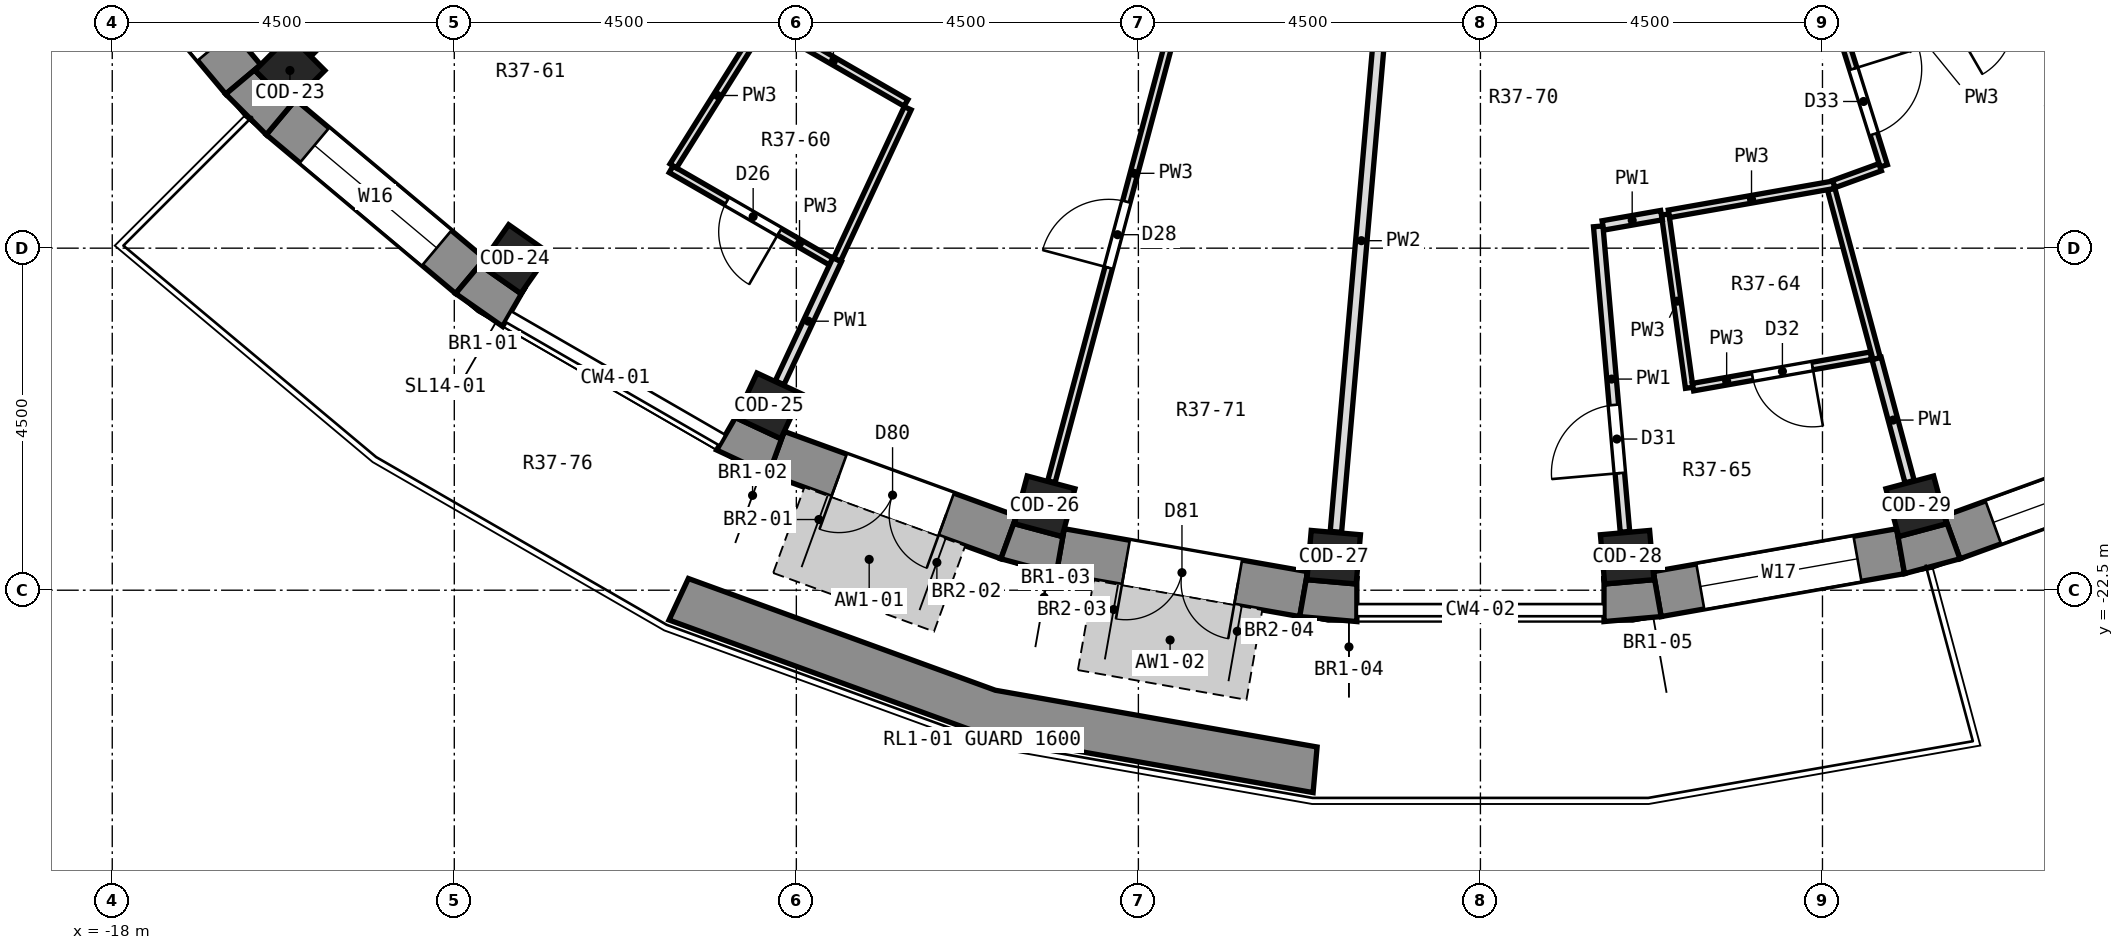
"""IFC4 building model, lengths in metres.
Left out: names, types, materials, properties, quantities, classifications, styles, units other than length and angle.
Written with IfcOpenShell. Run it as: python <this file> out.ifc"""

import sys

from ifc_helpers import new_model, si_unit, direction, frame, frame_2d, origin, origin_2d, place, context, subcontext, project, spatial, polyline, rectangle, outline, extrude, element, fill, save


model = new_model("IFC4")
c1 = context("Model", 3, precision=1e-05, world=origin(), true_north=direction((0.0, 1.0)))
c2 = subcontext(c1, "Body", "Model", "MODEL_VIEW")
j1 = project(units=[si_unit("LENGTHUNIT", "METRE"), si_unit("PLANEANGLEUNIT", "RADIAN")], contexts=[c1])
p1 = place(None, origin())
s1 = spatial("IfcSite", under=j1, at=p1, CompositionType="ELEMENT")
p2 = place(p1, origin())
s2 = spatial("IfcBuilding", under=s1, at=p2, CompositionType="ELEMENT")
p3 = place(p2, frame((0.0, 0.0, 269.3)))
s3 = spatial("IfcBuildingStorey", under=s2, at=p3, CompositionType="ELEMENT", Elevation=269.3)
for number, where, z_axis, x_axis in (
    (1, (-15.662, -15.662, 0.0), (0.0, 0.0, 1.0), (-0.707, -0.707, 0.0)),
    (2, (-12.705, -18.144, 0.0), (0.0, 0.0, 1.0), (-0.574, -0.819, 0.0)),
    (3, (-9.361, -20.075, 0.0), (0.0, 0.0, 1.0), (-0.423, -0.906, 0.0)),
    (4, (-5.733, -21.395, 0.0), (0.0, 0.0, 1.0), (-0.259, -0.966, 0.0)),
    (5, (-1.93, -22.066, 0.0), (0.0, 0.0, 1.0), (-0.087, -0.996, 0.0)),
    (6, (1.93, -22.066, 0.0), (0.0, 0.0, 1.0), (0.087, -0.996, 0.0)),
    (7, (5.733, -21.395, 0.0), (0.0, 0.0, 1.0), (0.259, -0.966, 0.0)),
):
    element("IfcColumn", number, at=place(p3, frame(where, z_axis=z_axis, x_axis=x_axis)), inside=s3, PredefinedType="COLUMN", context=c2, shape_type="SweptSolid", body=[
        extrude(rectangle(XDim=0.65, YDim=0.65, at=origin_2d()), origin(), (0.0, 0.0, 1.0), 3.3),
    ])
p4 = place(p3, frame((-18.367, -13.29, 0.0), z_axis=(0.0, 0.0, 1.0), x_axis=(0.64277291405, -0.766056773982, 0.0)))
e8 = element("IfcWall", 8, at=p4, inside=s3, PredefinedType="SOLIDWALL", context=c2, shape_type="SweptSolid", body=[
    extrude(rectangle(XDim=3.252, YDim=0.6, at=frame_2d((1.626, 0.0))), origin(), (0.0, 0.0, 1.0), 2.9),
])
p5 = place(p4, frame((0.576, 0.0, 0.9)))
e9 = element("IfcOpeningElement", 9, at=p5, cuts=e8, PredefinedType="OPENING", context=c2, shape_type="SweptSolid", body=[
    extrude(rectangle(XDim=2.1, YDim=1.8, at=frame_2d((1.05, 0.9))), frame((0.0, 0.312, 0.0), z_axis=(0.0, -1.0, 0.0), x_axis=(1.0, 0.0, 0.0)), (0.0, 0.0, 1.0), 0.624),
])
p6 = place(p3, frame((-15.781, -16.277, 0.0), z_axis=(0.0, 0.0, 1.0), x_axis=(0.766056773982, -0.64277291405, 0.0)))
e10 = element("IfcWall", 10, at=p6, inside=s3, PredefinedType="SOLIDWALL", context=c2, shape_type="SweptSolid", body=[
    extrude(rectangle(XDim=3.252, YDim=0.6, at=frame_2d((1.626, 0.0))), origin(), (0.0, 0.0, 1.0), 2.9),
])
p7 = place(p6, frame((0.576, 0.0, 0.9)))
e11 = element("IfcOpeningElement", 11, at=p7, cuts=e10, PredefinedType="OPENING", context=c2, shape_type="SweptSolid", body=[
    extrude(rectangle(XDim=2.1, YDim=1.8, at=frame_2d((1.05, 0.9))), frame((0.0, 0.312, 0.0), z_axis=(0.0, -1.0, 0.0), x_axis=(1.0, 0.0, 0.0)), (0.0, 0.0, 1.0), 0.624),
])
p8 = place(p3, frame((-9.262, -20.693, 0.0), z_axis=(0.0, 0.0, 1.0), x_axis=(0.939679383794, -0.342056509473, 0.0)))
e12 = element("IfcWall", 12, at=p8, inside=s3, PredefinedType="SOLIDWALL", context=c2, shape_type="SweptSolid", body=[
    extrude(rectangle(XDim=3.252, YDim=0.6, at=frame_2d((1.626, 0.0))), origin(), (0.0, 0.0, 1.0), 2.9),
])
p9 = place(p8, frame((0.876, 0.0, 0.0)))
e13 = element("IfcOpeningElement", 13, at=p9, cuts=e12, PredefinedType="OPENING", context=c2, shape_type="SweptSolid", body=[
    extrude(rectangle(XDim=1.5, YDim=2.4, at=frame_2d((0.75, 1.2))), frame((0.0, 0.312, 0.0), z_axis=(0.0, -1.0, 0.0), x_axis=(1.0, 0.0, 0.0)), (0.0, 0.0, 1.0), 0.624),
])
p10 = place(p3, frame((-5.528, -21.987, 0.0), z_axis=(0.0, 0.0, 1.0), x_axis=(0.984806225186, -0.173656842178, 0.0)))
e14 = element("IfcWall", 14, at=p10, inside=s3, PredefinedType="SOLIDWALL", context=c2, shape_type="SweptSolid", body=[
    extrude(rectangle(XDim=3.252, YDim=0.6, at=frame_2d((1.626, 0.0))), origin(), (0.0, 0.0, 1.0), 2.9),
])
p11 = place(p10, frame((0.876, 0.0, 0.0)))
e15 = element("IfcOpeningElement", 15, at=p11, cuts=e14, PredefinedType="OPENING", context=c2, shape_type="SweptSolid", body=[
    extrude(rectangle(XDim=1.5, YDim=2.4, at=frame_2d((0.75, 1.2))), frame((0.0, 0.312, 0.0), z_axis=(0.0, -1.0, 0.0), x_axis=(1.0, 0.0, 0.0)), (0.0, 0.0, 1.0), 0.624),
])
p12 = place(p3, frame((2.325, -22.551, 0.0), z_axis=(0.0, 0.0, 1.0), x_axis=(0.984806225186, 0.173656842178, 0.0)))
e16 = element("IfcWall", 16, at=p12, inside=s3, PredefinedType="SOLIDWALL", context=c2, shape_type="SweptSolid", body=[
    extrude(rectangle(XDim=3.252, YDim=0.6, at=frame_2d((1.626, 0.0))), origin(), (0.0, 0.0, 1.0), 2.9),
])
p13 = place(p12, frame((0.576, 0.0, 0.9)))
e17 = element("IfcOpeningElement", 17, at=p13, cuts=e16, PredefinedType="OPENING", context=c2, shape_type="SweptSolid", body=[
    extrude(rectangle(XDim=2.1, YDim=1.8, at=frame_2d((1.05, 0.9))), frame((0.0, 0.312, 0.0), z_axis=(0.0, -1.0, 0.0), x_axis=(1.0, 0.0, 0.0)), (0.0, 0.0, 1.0), 0.624),
])
p14 = place(p3, frame((6.206, -21.805, 0.0), z_axis=(0.0, 0.0, 1.0), x_axis=(0.939679383794, 0.342056509473, 0.0)))
e18 = element("IfcWall", 18, at=p14, inside=s3, PredefinedType="SOLIDWALL", context=c2, shape_type="SweptSolid", body=[
    extrude(rectangle(XDim=3.252, YDim=0.6, at=frame_2d((1.626, 0.0))), origin(), (0.0, 0.0, 1.0), 2.9),
])
p15 = place(p14, frame((0.576, 0.0, 0.9)))
e19 = element("IfcOpeningElement", 19, at=p15, cuts=e18, PredefinedType="OPENING", context=c2, shape_type="SweptSolid", body=[
    extrude(rectangle(XDim=2.1, YDim=1.8, at=frame_2d((1.05, 0.9))), frame((0.0, 0.312, 0.0), z_axis=(0.0, -1.0, 0.0), x_axis=(1.0, 0.0, 0.0)), (0.0, 0.0, 1.0), 0.624),
])
p16 = place(p3, origin())
e20 = element("IfcWall", 20, at=p16, inside=s3, PredefinedType="SOLIDWALL", context=c2, shape_type="SweptSolid", body=[
    extrude(outline(polyline([(-15.973, -16.507), (-15.588, -16.047), (-15.662, -16.122), (-16.122, -15.662), (-16.047, -15.588), (-16.507, -15.973), (-15.973, -16.507)])), origin(), (0.0, 0.0, 1.0), 2.9),
])
p17 = place(p3, origin())
e21 = element("IfcWall", 21, at=p17, inside=s3, PredefinedType="SOLIDWALL", context=c2, shape_type="SweptSolid", body=[
    extrude(outline(polyline([(-12.864, -19.03), (-12.564, -18.51), (-12.625, -18.597), (-13.157, -18.224), (-13.097, -18.137), (-13.482, -18.597), (-12.864, -19.03)])), origin(), (0.0, 0.0, 1.0), 2.9),
])
p18 = place(p3, origin())
e22 = element("IfcWall", 22, at=p18, inside=s3, PredefinedType="SOLIDWALL", context=c2, shape_type="SweptSolid", body=[
    extrude(outline(polyline([(-10.048, -20.656), (-9.364, -20.975), (-9.159, -20.411), (-9.204, -20.507), (-9.793, -20.232), (-9.748, -20.136), (-10.048, -20.656)])), origin(), (0.0, 0.0, 1.0), 2.9),
])
p19 = place(p3, origin())
e23 = element("IfcWall", 23, at=p19, inside=s3, PredefinedType="SOLIDWALL", context=c2, shape_type="SweptSolid", body=[
    extrude(outline(polyline([(-5.58, -22.282), (-5.476, -21.691), (-5.503, -21.793), (-6.131, -21.625), (-6.104, -21.523), (-6.309, -22.087), (-5.58, -22.282)])), origin(), (0.0, 0.0, 1.0), 2.9),
])
p20 = place(p3, origin())
e24 = element("IfcWall", 24, at=p20, inside=s3, PredefinedType="SOLIDWALL", context=c2, shape_type="SweptSolid", body=[
    extrude(outline(polyline([(-2.378, -22.847), (-1.626, -22.913), (-1.626, -22.312), (-1.635, -22.418), (-2.283, -22.361), (-2.273, -22.256), (-2.378, -22.847)])), origin(), (0.0, 0.0, 1.0), 2.9),
])
p21 = place(p3, origin())
e25 = element("IfcWall", 25, at=p21, inside=s3, PredefinedType="SOLIDWALL", context=c2, shape_type="SweptSolid", body=[
    extrude(outline(polyline([(1.626, -22.913), (2.378, -22.847), (2.273, -22.256), (2.283, -22.361), (1.635, -22.418), (1.626, -22.312), (1.626, -22.913)])), origin(), (0.0, 0.0, 1.0), 2.9),
])
p22 = place(p3, origin())
e26 = element("IfcWall", 26, at=p22, inside=s3, PredefinedType="SOLIDWALL", context=c2, shape_type="SweptSolid", body=[
    extrude(outline(polyline([(6.309, -22.087), (6.104, -21.523), (6.131, -21.625), (5.503, -21.793), (5.476, -21.691), (5.58, -22.282), (6.309, -22.087)])), origin(), (0.0, 0.0, 1.0), 2.9),
])
p23 = place(p3, origin())
e27 = element("IfcWall", 27, at=p23, inside=s3, PredefinedType="PARAPET", context=c2, shape_type="SweptSolid", body=[
    extrude(outline(polyline([(-10.675, -22.892), (-6.537, -24.398), (-2.201, -25.163), (-2.149, -24.562), (-6.382, -23.816), (-10.42, -22.346), (-10.675, -22.892)])), origin(), (0.0, 0.0, 1.0), 0.5),
])
p24 = place(p3, frame((1.55, -17.713, 0.0), z_axis=(0.0, 0.0, 1.0), x_axis=(0.087206738893, -0.996190235192, 0.0)))
e28 = element("IfcWall", 28, at=p24, inside=s3, PredefinedType="PARTITIONING", context=c2, shape_type="SweptSolid", body=[
    extrude(rectangle(XDim=4.034, YDim=0.125, at=frame_2d((2.017, 0.0))), origin(), (0.0, 0.0, 1.0), 2.9),
])
p25 = place(p24, frame((2.359, 0.0, 0.0)))
e29 = element("IfcOpeningElement", 29, at=p25, cuts=e28, PredefinedType="OPENING", context=c2, shape_type="SweptSolid", body=[
    extrude(rectangle(XDim=0.9, YDim=2.1, at=frame_2d((0.45, 1.05))), frame((0.0, 0.074, 0.0), z_axis=(0.0, -1.0, 0.0), x_axis=(1.0, 0.0, 0.0)), (0.0, 0.0, 1.0), 0.149),
])
p26 = place(p3, frame((2.431, -17.557, 0.0), z_axis=(0.0, 0.0, 1.0), x_axis=(0.137351585164, -0.990522358179, 0.0)))
e30 = element("IfcWall", 30, at=p26, inside=s3, PredefinedType="PARTITIONING", context=c2, shape_type="SweptSolid", body=[
    extrude(rectangle(XDim=2.302, YDim=0.1, at=frame_2d((1.151, 0.0))), origin(), (0.0, 0.0, 1.0), 2.9),
])
p27 = place(p3, frame((4.615, -17.222, 0.0), z_axis=(0.0, 0.0, 1.0), x_axis=(0.259222412409, -0.965817654066, 0.0)))
e31 = element("IfcWall", 31, at=p27, inside=s3, PredefinedType="PARTITIONING", context=c2, shape_type="SweptSolid", body=[
    extrude(rectangle(XDim=2.308, YDim=0.1, at=frame_2d((1.154, 0.0))), origin(), (0.0, 0.0, 1.0), 2.9),
])
p28 = place(p3, frame((5.212, -19.452, 0.0), z_axis=(0.0, 0.0, 1.0), x_axis=(0.259221341364, -0.96581794153, 0.0)))
e32 = element("IfcWall", 32, at=p28, inside=s3, PredefinedType="PARTITIONING", context=c2, shape_type="SweptSolid", body=[
    extrude(rectangle(XDim=1.677, YDim=0.125, at=frame_2d((0.838, 0.0))), origin(), (0.0, 0.0, 1.0), 2.9),
])
p29 = place(p3, frame((4.315, -13.758, 0.0), z_axis=(0.0, 0.0, 1.0), x_axis=(0.299479577404, -0.95410271078, 0.0)))
e33 = element("IfcWall", 33, at=p29, inside=s3, PredefinedType="PARTITIONING", context=c2, shape_type="SweptSolid", body=[
    extrude(rectangle(XDim=3.312, YDim=0.1, at=frame_2d((1.656, 0.0))), origin(), (0.0, 0.0, 1.0), 2.9),
])
p30 = place(p29, frame((1.974, 0.0, 0.0)))
e34 = element("IfcOpeningElement", 34, at=p30, cuts=e33, PredefinedType="OPENING", context=c2, shape_type="SweptSolid", body=[
    extrude(rectangle(XDim=0.9, YDim=2.1, at=frame_2d((0.45, 1.05))), frame((0.0, 0.062, 0.0), z_axis=(0.0, -1.0, 0.0), x_axis=(1.0, 0.0, 0.0)), (0.0, 0.0, 1.0), 0.124),
])
p31 = place(p3, frame((-10.647, -16.962, 0.0), z_axis=(0.0, 0.0, 1.0), x_axis=(0.866072215893, -0.499918910283, 0.0)))
e35 = element("IfcWall", 35, at=p31, inside=s3, PredefinedType="PARTITIONING", context=c2, shape_type="SweptSolid", body=[
    extrude(rectangle(XDim=2.438, YDim=0.1, at=frame_2d((1.219, 0.0))), origin(), (0.0, 0.0, 1.0), 2.9),
])
p32 = place(p31, frame((0.846, 0.0, 0.0)))
e36 = element("IfcOpeningElement", 36, at=p32, cuts=e35, PredefinedType="OPENING", context=c2, shape_type="SweptSolid", body=[
    extrude(rectangle(XDim=0.8, YDim=2.1, at=frame_2d((0.4, 1.05))), frame((0.0, 0.062, 0.0), z_axis=(0.0, -1.0, 0.0), x_axis=(1.0, 0.0, 0.0)), (0.0, 0.0, 1.0), 0.124),
])
p33 = place(p3, frame((-9.467, -14.986, 0.0), z_axis=(0.0, 0.0, 1.0), x_axis=(0.866006764117, -0.500032283461, 0.0)))
e37 = element("IfcWall", 37, at=p33, inside=s3, PredefinedType="PARTITIONING", context=c2, shape_type="SweptSolid", body=[
    extrude(rectangle(XDim=2.205, YDim=0.1, at=frame_2d((1.103, 0.0))), origin(), (0.0, 0.0, 1.0), 2.9),
])
p34 = place(p3, frame((2.796, -19.828, 0.0), z_axis=(0.0, 0.0, 1.0), x_axis=(0.984754600233, 0.173949352742, 0.0)))
e38 = element("IfcWall", 38, at=p34, inside=s3, PredefinedType="PARTITIONING", context=c2, shape_type="SweptSolid", body=[
    extrude(rectangle(XDim=2.377, YDim=0.1, at=frame_2d((1.189, 0.0))), origin(), (0.0, 0.0, 1.0), 2.9),
])
p35 = place(p34, frame((0.795, 0.0, 0.0)))
e39 = element("IfcOpeningElement", 39, at=p35, cuts=e38, PredefinedType="OPENING", context=c2, shape_type="SweptSolid", body=[
    extrude(rectangle(XDim=0.8, YDim=2.1, at=frame_2d((0.4, 1.05))), frame((0.0, 0.062, 0.0), z_axis=(0.0, -1.0, 0.0), x_axis=(1.0, 0.0, 0.0)), (0.0, 0.0, 1.0), 0.124),
])
p36 = place(p3, frame((2.48, -17.548, 0.0), z_axis=(0.0, 0.0, 1.0), x_axis=(0.984791356236, 0.173741142745, 0.0)))
e40 = element("IfcWall", 40, at=p36, inside=s3, PredefinedType="PARTITIONING", context=c2, shape_type="SweptSolid", body=[
    extrude(rectangle(XDim=2.206, YDim=0.1, at=frame_2d((1.103, 0.0))), origin(), (0.0, 0.0, 1.0), 2.9),
])
p37 = place(p3, frame((1.612, -17.701, 0.0), z_axis=(0.0, 0.0, 1.0), x_axis=(0.984877691651, 0.173251067786, 0.0)))
e41 = element("IfcWall", 41, at=p37, inside=s3, PredefinedType="PARTITIONING", context=c2, shape_type="SweptSolid", body=[
    extrude(rectangle(XDim=0.782, YDim=0.125, at=frame_2d((0.391, 0.0))), origin(), (0.0, 0.0, 1.0), 2.9),
])
p38 = place(p3, frame((4.65, -17.156, 0.0), z_axis=(0.0, 0.0, 1.0), x_axis=(0.939771391362, 0.341803645353, 0.0)))
e42 = element("IfcWall", 42, at=p38, inside=s3, PredefinedType="PARTITIONING", context=c2, shape_type="SweptSolid", body=[
    extrude(rectangle(XDim=0.647, YDim=0.1, at=frame_2d((0.324, 0.0))), origin(), (0.0, 0.0, 1.0), 2.9),
])
p39 = place(p3, frame((-15.426, -15.426, 0.0), z_axis=(0.0, 0.0, 1.0), x_axis=(0.707106781187, 0.707106781187, 0.0)))
e43 = element("IfcWall", 43, at=p39, inside=s3, PredefinedType="PARTITIONING", context=c2, shape_type="SweptSolid", body=[
    extrude(rectangle(XDim=7.248, YDim=0.125, at=frame_2d((3.624, 0.0))), origin(), (0.0, 0.0, 1.0), 2.9),
])
p40 = place(p3, frame((-10.619, -16.918, 0.0), z_axis=(0.0, 0.0, 1.0), x_axis=(0.531622942945, 0.84698113706, 0.0)))
e44 = element("IfcWall", 44, at=p40, inside=s3, PredefinedType="PARTITIONING", context=c2, shape_type="SweptSolid", body=[
    extrude(rectangle(XDim=2.188, YDim=0.1, at=frame_2d((1.094, 0.0))), origin(), (0.0, 0.0, 1.0), 2.9),
])
p41 = place(p3, frame((-9.22, -19.771, 0.0), z_axis=(0.0, 0.0, 1.0), x_axis=(0.423191849194, 0.906040097775, 0.0)))
e45 = element("IfcWall", 45, at=p41, inside=s3, PredefinedType="PARTITIONING", context=c2, shape_type="SweptSolid", body=[
    extrude(rectangle(XDim=1.788, YDim=0.125, at=frame_2d((0.894, 0.0))), origin(), (0.0, 0.0, 1.0), 2.9),
])
p42 = place(p3, frame((-8.464, -18.15, 0.0), z_axis=(0.0, 0.0, 1.0), x_axis=(0.422599526454, 0.906316523208, 0.0)))
e46 = element("IfcWall", 46, at=p42, inside=s3, PredefinedType="PARTITIONING", context=c2, shape_type="SweptSolid", body=[
    extrude(rectangle(XDim=2.197, YDim=0.1, at=frame_2d((1.099, 0.0))), origin(), (0.0, 0.0, 1.0), 2.9),
])
p43 = place(p3, frame((-5.644, -21.072, 0.0), z_axis=(0.0, 0.0, 1.0), x_axis=(0.258605886827, 0.96598291667, 0.0)))
e47 = element("IfcWall", 47, at=p43, inside=s3, PredefinedType="PARTITIONING", context=c2, shape_type="SweptSolid", body=[
    extrude(rectangle(XDim=7.249, YDim=0.1, at=frame_2d((3.624, 0.0))), origin(), (0.0, 0.0, 1.0), 2.9),
])
p44 = place(p43, frame((2.914, 0.0, 0.0)))
e48 = element("IfcOpeningElement", 48, at=p44, cuts=e47, PredefinedType="OPENING", context=c2, shape_type="SweptSolid", body=[
    extrude(rectangle(XDim=0.9, YDim=2.1, at=frame_2d((0.45, 1.05))), frame((0.0, 0.062, 0.0), z_axis=(0.0, -1.0, 0.0), x_axis=(1.0, 0.0, 0.0)), (0.0, 0.0, 1.0), 0.124),
])
p45 = place(p3, frame((-1.901, -21.732, 0.0), z_axis=(0.0, 0.0, 1.0), x_axis=(0.087062572149, 0.996202845073, 0.0)))
e49 = element("IfcWall", 49, at=p45, inside=s3, PredefinedType="PARTITIONING", context=c2, shape_type="SweptSolid", body=[
    extrude(rectangle(XDim=7.689, YDim=0.15, at=frame_2d((3.845, 0.0))), origin(), (0.0, 0.0, 1.0), 2.9),
])
p46 = place(p7, origin())
e50 = element("IfcWindow", 50, at=p46, inside=s3, PartitioningType="SINGLE_PANEL", PredefinedType="WINDOW", context=c2, shape_type="SweptSolid", body=[
    extrude(rectangle(XDim=2.1, YDim=1.8, at=frame_2d((1.05, 0.9))), frame((0.0, 0.18, 0.0), z_axis=(0.0, -1.0, 0.0), x_axis=(1.0, 0.0, 0.0)), (0.0, 0.0, 1.0), 0.06),
])
fill(e11, e50)
p47 = place(p9, frame((1.5, 0.0, 0.0), z_axis=(0.0, 0.0, 1.0), x_axis=(-1.0, 0.0, 0.0)))
e51 = element("IfcDoor", 51, at=p47, inside=s3, OperationType="DOUBLE_DOOR_SINGLE_SWING", PredefinedType="DOOR", context=c2, shape_type="SweptSolid", body=[
    extrude(rectangle(XDim=1.5, YDim=2.4, at=frame_2d((0.75, 1.2))), frame((0.0, -0.075, 0.0), z_axis=(0.0, -1.0, 0.0), x_axis=(1.0, 0.0, 0.0)), (0.0, 0.0, 1.0), 0.05),
])
fill(e13, e51)
p48 = place(p11, frame((1.5, 0.0, 0.0), z_axis=(0.0, 0.0, 1.0), x_axis=(-1.0, 0.0, 0.0)))
e52 = element("IfcDoor", 52, at=p48, inside=s3, OperationType="DOUBLE_DOOR_SINGLE_SWING", PredefinedType="DOOR", context=c2, shape_type="SweptSolid", body=[
    extrude(rectangle(XDim=1.5, YDim=2.4, at=frame_2d((0.75, 1.2))), frame((0.0, -0.075, 0.0), z_axis=(0.0, -1.0, 0.0), x_axis=(1.0, 0.0, 0.0)), (0.0, 0.0, 1.0), 0.05),
])
fill(e15, e52)
p49 = place(p13, origin())
e53 = element("IfcWindow", 53, at=p49, inside=s3, PartitioningType="SINGLE_PANEL", PredefinedType="WINDOW", context=c2, shape_type="SweptSolid", body=[
    extrude(rectangle(XDim=2.1, YDim=1.8, at=frame_2d((1.05, 0.9))), frame((0.0, 0.18, 0.0), z_axis=(0.0, -1.0, 0.0), x_axis=(1.0, 0.0, 0.0)), (0.0, 0.0, 1.0), 0.06),
])
fill(e17, e53)
p50 = place(p15, origin())
e54 = element("IfcWindow", 54, at=p50, inside=s3, PartitioningType="SINGLE_PANEL", PredefinedType="WINDOW", context=c2, shape_type="SweptSolid", body=[
    extrude(rectangle(XDim=2.1, YDim=1.8, at=frame_2d((1.05, 0.9))), frame((0.0, 0.18, 0.0), z_axis=(0.0, -1.0, 0.0), x_axis=(1.0, 0.0, 0.0)), (0.0, 0.0, 1.0), 0.06),
])
fill(e19, e54)
p51 = place(p32, frame((0.8, 0.0, 0.0), z_axis=(0.0, 0.0, 1.0), x_axis=(-1.0, 0.0, 0.0)))
e55 = element("IfcDoor", 55, at=p51, inside=s3, OperationType="SINGLE_SWING_LEFT", PredefinedType="DOOR", context=c2, shape_type="SweptSolid", body=[
    extrude(rectangle(XDim=0.8, YDim=2.1, at=frame_2d((0.4, 1.05))), frame((0.0, 0.025, 0.0), z_axis=(0.0, -1.0, 0.0), x_axis=(1.0, 0.0, 0.0)), (0.0, 0.0, 1.0), 0.05),
])
fill(e36, e55)
p52 = place(p44, origin())
e56 = element("IfcDoor", 56, at=p52, inside=s3, OperationType="SINGLE_SWING_LEFT", PredefinedType="DOOR", context=c2, shape_type="SweptSolid", body=[
    extrude(rectangle(XDim=0.9, YDim=2.1, at=frame_2d((0.45, 1.05))), frame((0.0, 0.025, 0.0), z_axis=(0.0, -1.0, 0.0), x_axis=(1.0, 0.0, 0.0)), (0.0, 0.0, 1.0), 0.05),
])
fill(e48, e56)
p53 = place(p25, frame((0.9, 0.0, 0.0), z_axis=(0.0, 0.0, 1.0), x_axis=(-1.0, 0.0, 0.0)))
e57 = element("IfcDoor", 57, at=p53, inside=s3, OperationType="SINGLE_SWING_LEFT", PredefinedType="DOOR", context=c2, shape_type="SweptSolid", body=[
    extrude(rectangle(XDim=0.9, YDim=2.1, at=frame_2d((0.45, 1.05))), frame((0.0, 0.025, 0.0), z_axis=(0.0, -1.0, 0.0), x_axis=(1.0, 0.0, 0.0)), (0.0, 0.0, 1.0), 0.05),
])
fill(e29, e57)
p54 = place(p35, frame((0.8, 0.0, 0.0), z_axis=(0.0, 0.0, 1.0), x_axis=(-1.0, 0.0, 0.0)))
e58 = element("IfcDoor", 58, at=p54, inside=s3, OperationType="SINGLE_SWING_LEFT", PredefinedType="DOOR", context=c2, shape_type="SweptSolid", body=[
    extrude(rectangle(XDim=0.8, YDim=2.1, at=frame_2d((0.4, 1.05))), frame((0.0, 0.025, 0.0), z_axis=(0.0, -1.0, 0.0), x_axis=(1.0, 0.0, 0.0)), (0.0, 0.0, 1.0), 0.05),
])
fill(e39, e58)
p55 = place(p30, origin())
e59 = element("IfcDoor", 59, at=p55, inside=s3, OperationType="SINGLE_SWING_LEFT", PredefinedType="DOOR", context=c2, shape_type="SweptSolid", body=[
    extrude(rectangle(XDim=0.9, YDim=2.1, at=frame_2d((0.45, 1.05))), frame((0.0, 0.025, 0.0), z_axis=(0.0, -1.0, 0.0), x_axis=(1.0, 0.0, 0.0)), (0.0, 0.0, 1.0), 0.05),
])
fill(e34, e59)
save(model, sys.argv[1])
